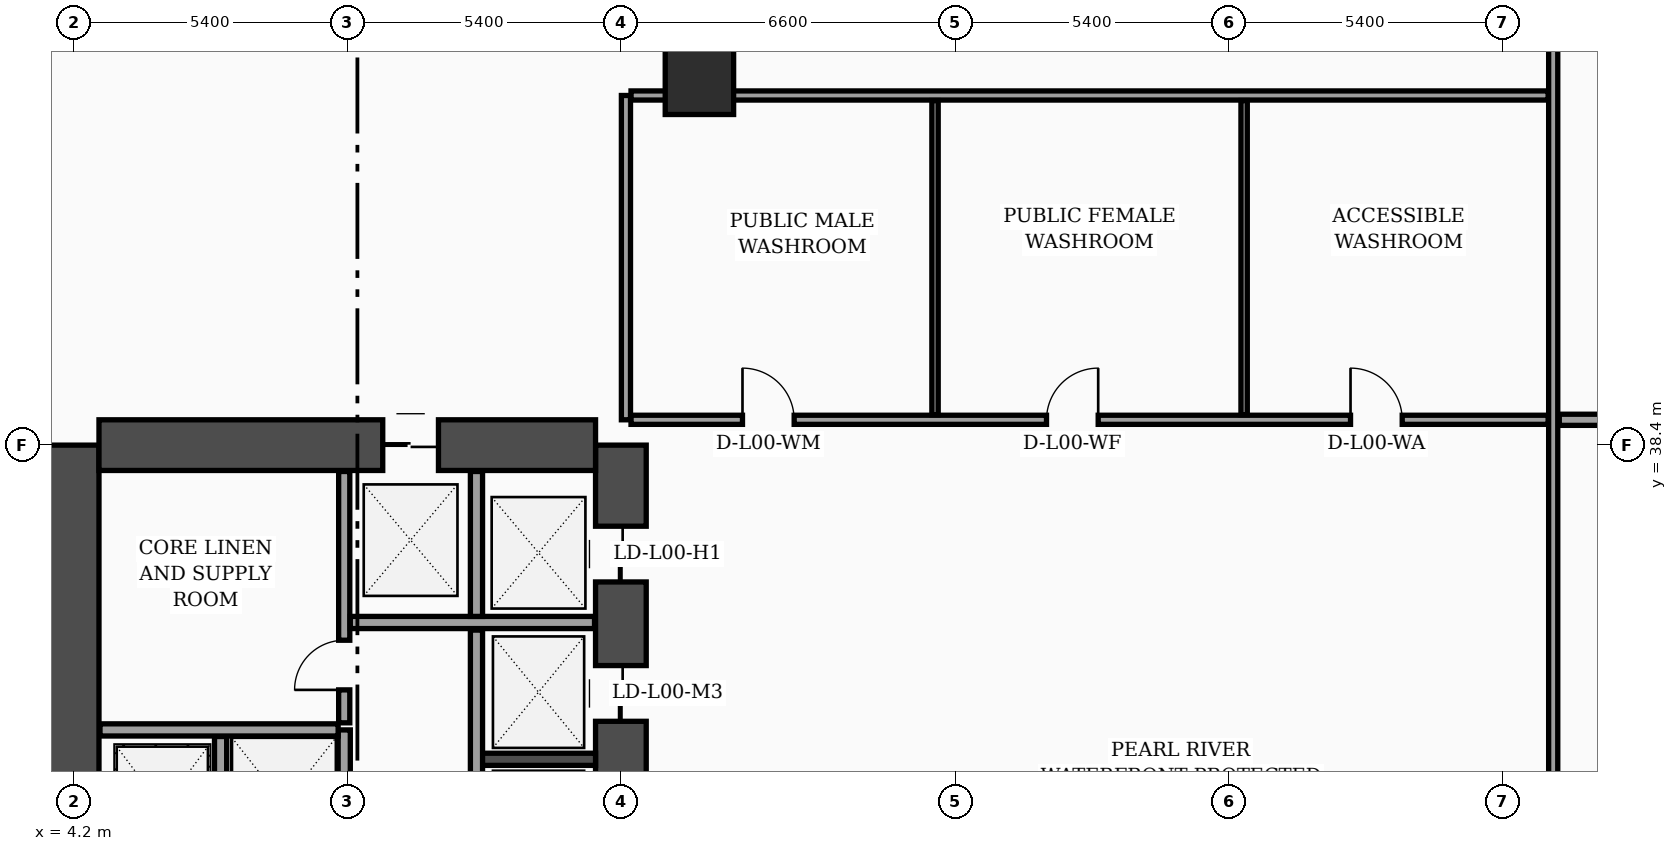
"""IFC4 building model, lengths in metres.
Left out: names, types, materials, properties, quantities, classifications, styles, units other than length and angle.
Written with IfcOpenShell. Run it as: python <this file> out.ifc"""

import sys

from ifc_helpers import new_model, si_unit, direction, frame, frame_2d, origin, origin_2d, place, context, subcontext, project, spatial, rectangle, extrude, element, fill, save


model = new_model("IFC4")
c1 = context("Model", 3, precision=1e-05, world=origin(), true_north=direction((0.0, 1.0)))
c2 = subcontext(c1, "Body", "Model", "MODEL_VIEW")
j1 = project(units=[si_unit("LENGTHUNIT", "METRE"), si_unit("PLANEANGLEUNIT", "RADIAN")], contexts=[c1])
p1 = place(None, origin())
s1 = spatial("IfcSite", under=j1, at=p1, CompositionType="ELEMENT")
p2 = place(p1, origin())
s2 = spatial("IfcBuilding", under=s1, at=p2, CompositionType="ELEMENT")
p3 = place(p2, origin())
s3 = spatial("IfcBuildingStorey", under=s2, at=p3, CompositionType="ELEMENT", Elevation=0.0)
p4 = place(p3, frame((4.2, 16.8, 0.0), z_axis=(0.0, 0.0, 1.0), x_axis=(0.0, 1.0, 0.0)))
e1 = element("IfcWall", 1, at=p4, inside=s3, PredefinedType="SHEAR", context=c2, shape_type="SweptSolid", body=[
    extrude(rectangle(XDim=21.6, YDim=1.0, at=frame_2d((10.8, 0.0))), origin(), (0.0, 0.0, 1.0), 5.68),
])
p5 = place(p3, frame((15.0, 16.8, 0.0), z_axis=(0.0, 0.0, 1.0), x_axis=(0.0, 1.0, 0.0)))
e2 = element("IfcWall", 2, at=p5, inside=s3, PredefinedType="SHEAR", context=c2, shape_type="SweptSolid", body=[
    extrude(rectangle(XDim=21.6, YDim=1.0, at=frame_2d((10.8, 0.0))), origin(), (0.0, 0.0, 1.0), 5.68),
])
p6 = place(p5, frame((8.65, 0.0, 0.0)))
e3 = element("IfcOpeningElement", 3, at=p6, cuts=e2, PredefinedType="OPENING", context=c2, shape_type="SweptSolid", body=[
    extrude(rectangle(XDim=1.1, YDim=2.2, at=frame_2d((0.55, 1.1))), frame((0.0, 0.51, 0.0), z_axis=(0.0, -1.0, 0.0), x_axis=(1.0, 0.0, 0.0)), (0.0, 0.0, 1.0), 1.02),
])
p7 = place(p5, frame((1.25, 0.0, 0.0)))
e4 = element("IfcOpeningElement", 4, at=p7, cuts=e2, PredefinedType="OPENING", context=c2, shape_type="SweptSolid", body=[
    extrude(rectangle(XDim=1.1, YDim=2.2, at=frame_2d((0.55, 1.1))), frame((0.0, 0.51, 0.0), z_axis=(0.0, -1.0, 0.0), x_axis=(1.0, 0.0, 0.0)), (0.0, 0.0, 1.0), 1.02),
])
p8 = place(p5, frame((3.8, 0.0, 0.0)))
e5 = element("IfcOpeningElement", 5, at=p8, cuts=e2, PredefinedType="OPENING", context=c2, shape_type="SweptSolid", body=[
    extrude(rectangle(XDim=1.1, YDim=2.2, at=frame_2d((0.55, 1.1))), frame((0.0, 0.51, 0.0), z_axis=(0.0, -1.0, 0.0), x_axis=(1.0, 0.0, 0.0)), (0.0, 0.0, 1.0), 1.02),
])
p9 = place(p5, frame((6.35, 0.0, 0.0)))
e6 = element("IfcOpeningElement", 6, at=p9, cuts=e2, PredefinedType="OPENING", context=c2, shape_type="SweptSolid", body=[
    extrude(rectangle(XDim=1.1, YDim=2.2, at=frame_2d((0.55, 1.1))), frame((0.0, 0.51, 0.0), z_axis=(0.0, -1.0, 0.0), x_axis=(1.0, 0.0, 0.0)), (0.0, 0.0, 1.0), 1.02),
])
p10 = place(p5, frame((10.85, 0.0, 0.0)))
e7 = element("IfcOpeningElement", 7, at=p10, cuts=e2, PredefinedType="OPENING", context=c2, shape_type="SweptSolid", body=[
    extrude(rectangle(XDim=1.1, YDim=2.2, at=frame_2d((0.55, 1.1))), frame((0.0, 0.51, 0.0), z_axis=(0.0, -1.0, 0.0), x_axis=(1.0, 0.0, 0.0)), (0.0, 0.0, 1.0), 1.02),
])
p11 = place(p5, frame((13.5, 0.0, 0.0)))
e8 = element("IfcOpeningElement", 8, at=p11, cuts=e2, PredefinedType="OPENING", context=c2, shape_type="SweptSolid", body=[
    extrude(rectangle(XDim=1.1, YDim=2.2, at=frame_2d((0.55, 1.1))), frame((0.0, 0.51, 0.0), z_axis=(0.0, -1.0, 0.0), x_axis=(1.0, 0.0, 0.0)), (0.0, 0.0, 1.0), 1.02),
])
p12 = place(p5, frame((16.15, 0.0, 0.0)))
e9 = element("IfcOpeningElement", 9, at=p12, cuts=e2, PredefinedType="OPENING", context=c2, shape_type="SweptSolid", body=[
    extrude(rectangle(XDim=1.1, YDim=2.2, at=frame_2d((0.55, 1.1))), frame((0.0, 0.51, 0.0), z_axis=(0.0, -1.0, 0.0), x_axis=(1.0, 0.0, 0.0)), (0.0, 0.0, 1.0), 1.02),
])
p13 = place(p5, frame((18.9, 0.0, 0.0)))
e10 = element("IfcOpeningElement", 10, at=p13, cuts=e2, PredefinedType="OPENING", context=c2, shape_type="SweptSolid", body=[
    extrude(rectangle(XDim=1.1, YDim=2.2, at=frame_2d((0.55, 1.1))), frame((0.0, 0.51, 0.0), z_axis=(0.0, -1.0, 0.0), x_axis=(1.0, 0.0, 0.0)), (0.0, 0.0, 1.0), 1.02),
])
p14 = place(p3, frame((4.7, 38.4, 0.0), z_axis=(0.0, 0.0, 1.0), x_axis=(1.0, 0.0, 0.0)))
e11 = element("IfcWall", 11, at=p14, inside=s3, PredefinedType="SHEAR", context=c2, shape_type="SweptSolid", body=[
    extrude(rectangle(XDim=9.8, YDim=1.0, at=frame_2d((4.9, 0.0))), origin(), (0.0, 0.0, 1.0), 5.68),
])
p15 = place(p14, frame((5.6, 0.0, 0.0)))
e12 = element("IfcOpeningElement", 12, at=p15, cuts=e11, PredefinedType="OPENING", context=c2, shape_type="SweptSolid", body=[
    extrude(rectangle(XDim=1.1, YDim=2.2, at=frame_2d((0.55, 1.1))), frame((0.0, 0.51, 0.0), z_axis=(0.0, -1.0, 0.0), x_axis=(1.0, 0.0, 0.0)), (0.0, 0.0, 1.0), 1.02),
])
p16 = place(p3, frame((12.18, 32.2, 0.0), z_axis=(0.0, 0.0, 1.0), x_axis=(1.0, 0.0, 0.0)))
e13 = element("IfcWall", 13, at=p16, inside=s3, PredefinedType="SOLIDWALL", context=c2, shape_type="SweptSolid", body=[
    extrude(rectangle(XDim=2.32, YDim=0.24, at=frame_2d((1.16, 0.0))), origin(), (0.0, 0.0, 1.0), 5.68),
])
p17 = place(p3, frame((16.55, 45.6, 0.0), z_axis=(0.0, 0.0, 1.0), x_axis=(1.0, 0.0, 0.0)))
e14 = element("IfcColumn", 14, at=p17, inside=s3, PredefinedType="COLUMN", context=c2, shape_type="SweptSolid", body=[
    extrude(rectangle(XDim=1.35, YDim=1.35, at=origin_2d()), origin(), (0.0, 0.0, 1.0), 5.68),
])
p18 = place(p3, frame((7.1, 30.02, 0.0), z_axis=(0.0, 0.0, 1.0), x_axis=(0.0, 1.0, 0.0)))
e15 = element("IfcWall", 15, at=p18, inside=s3, PredefinedType="SOLIDWALL", context=c2, shape_type="SweptSolid", body=[
    extrude(rectangle(XDim=2.63, YDim=0.24, at=frame_2d((1.315, 0.0))), origin(), (0.0, 0.0, 1.0), 5.68),
])
p19 = place(p3, frame((9.54, 29.88, 0.0), z_axis=(0.0, 0.0, 1.0), x_axis=(0.0, 1.0, 0.0)))
e16 = element("IfcWall", 16, at=p19, inside=s3, PredefinedType="SOLIDWALL", context=c2, shape_type="SweptSolid", body=[
    extrude(rectangle(XDim=2.9, YDim=0.24, at=frame_2d((1.45, 0.0))), origin(), (0.0, 0.0, 1.0), 5.68),
])
p20 = place(p19, frame((0.7, 0.0, 0.0)))
e17 = element("IfcOpeningElement", 17, at=p20, cuts=e16, PredefinedType="OPENING", context=c2, shape_type="SweptSolid", body=[
    extrude(rectangle(XDim=1.3, YDim=2.35, at=frame_2d((0.65, 1.175))), frame((0.0, 0.13, 0.0), z_axis=(0.0, -1.0, 0.0), x_axis=(1.0, 0.0, 0.0)), (0.0, 0.0, 1.0), 0.26),
])
p21 = place(p3, frame((4.72, 32.78, 0.0), z_axis=(0.0, 0.0, 1.0), x_axis=(1.0, 0.0, 0.0)))
e18 = element("IfcWall", 18, at=p21, inside=s3, PredefinedType="SOLIDWALL", context=c2, shape_type="SweptSolid", body=[
    extrude(rectangle(XDim=4.7, YDim=0.24, at=frame_2d((2.35, 0.0))), origin(), (0.0, 0.0, 1.0), 5.68),
])
p22 = place(p3, frame((9.54, 32.92, 0.0), z_axis=(0.0, 0.0, 1.0), x_axis=(0.0, 1.0, 0.0)))
e19 = element("IfcWall", 19, at=p22, inside=s3, PredefinedType="SOLIDWALL", context=c2, shape_type="SweptSolid", body=[
    extrude(rectangle(XDim=4.96, YDim=0.22, at=frame_2d((2.48, 0.0))), origin(), (0.0, 0.0, 1.0), 5.68),
])
p23 = place(p22, frame((0.65, 0.0, 0.0)))
e20 = element("IfcOpeningElement", 20, at=p23, cuts=e19, PredefinedType="OPENING", context=c2, shape_type="SweptSolid", body=[
    extrude(rectangle(XDim=0.98, YDim=2.15, at=frame_2d((0.49, 1.075))), frame((0.0, 0.12, 0.0), z_axis=(0.0, -1.0, 0.0), x_axis=(1.0, 0.0, 0.0)), (0.0, 0.0, 1.0), 0.24),
])
p24 = place(p3, frame((12.15, 27.0, 0.0), z_axis=(0.0, 0.0, 1.0), x_axis=(0.0, 1.0, 0.0)))
e21 = element("IfcWall", 21, at=p24, inside=s3, PredefinedType="SOLIDWALL", context=c2, shape_type="SweptSolid", body=[
    extrude(rectangle(XDim=7.75, YDim=0.24, at=frame_2d((3.875, 0.0))), origin(), (0.0, 0.0, 1.0), 5.68),
])
p25 = place(p3, frame((9.66, 34.9, 0.0), z_axis=(0.0, 0.0, 1.0), x_axis=(1.0, 0.0, 0.0)))
e22 = element("IfcWall", 22, at=p25, inside=s3, PredefinedType="SOLIDWALL", context=c2, shape_type="SweptSolid", body=[
    extrude(rectangle(XDim=4.82, YDim=0.24, at=frame_2d((2.41, 0.0))), origin(), (0.0, 0.0, 1.0), 5.68),
])
p26 = place(p3, frame((12.15, 35.02, 0.0), z_axis=(0.0, 0.0, 1.0), x_axis=(0.0, 1.0, 0.0)))
e23 = element("IfcWall", 23, at=p26, inside=s3, PredefinedType="SOLIDWALL", context=c2, shape_type="SweptSolid", body=[
    extrude(rectangle(XDim=2.86, YDim=0.24, at=frame_2d((1.43, 0.0))), origin(), (0.0, 0.0, 1.0), 5.68),
])
p27 = place(p3, frame((15.2, 38.9, 0.0), z_axis=(0.0, 0.0, 1.0), x_axis=(1.0, 0.0, 0.0)))
e24 = element("IfcWall", 24, at=p27, inside=s3, PredefinedType="PARTITIONING", context=c2, shape_type="SweptSolid", body=[
    extrude(rectangle(XDim=18.1, YDim=0.18, at=frame_2d((9.05, 0.0))), origin(), (0.0, 0.0, 1.0), 4.88),
])
p28 = place(p27, frame((2.2, 0.0, 0.0)))
e25 = element("IfcOpeningElement", 25, at=p28, cuts=e24, PredefinedType="OPENING", context=c2, shape_type="SweptSolid", body=[
    extrude(rectangle(XDim=1.02, YDim=2.2, at=frame_2d((0.51, 1.1))), frame((0.0, 0.1, 0.0), z_axis=(0.0, -1.0, 0.0), x_axis=(1.0, 0.0, 0.0)), (0.0, 0.0, 1.0), 0.2),
])
p29 = place(p27, frame((8.2, 0.0, 0.0)))
e26 = element("IfcOpeningElement", 26, at=p29, cuts=e24, PredefinedType="OPENING", context=c2, shape_type="SweptSolid", body=[
    extrude(rectangle(XDim=1.02, YDim=2.2, at=frame_2d((0.51, 1.1))), frame((0.0, 0.1, 0.0), z_axis=(0.0, -1.0, 0.0), x_axis=(1.0, 0.0, 0.0)), (0.0, 0.0, 1.0), 0.2),
])
p30 = place(p27, frame((14.2, 0.0, 0.0)))
e27 = element("IfcOpeningElement", 27, at=p30, cuts=e24, PredefinedType="OPENING", context=c2, shape_type="SweptSolid", body=[
    extrude(rectangle(XDim=1.02, YDim=2.2, at=frame_2d((0.51, 1.1))), frame((0.0, 0.1, 0.0), z_axis=(0.0, -1.0, 0.0), x_axis=(1.0, 0.0, 0.0)), (0.0, 0.0, 1.0), 0.2),
])
p31 = place(p3, frame((15.2, 45.3, 0.0), z_axis=(0.0, 0.0, 1.0), x_axis=(1.0, 0.0, 0.0)))
e28 = element("IfcWall", 28, at=p31, inside=s3, PredefinedType="PARTITIONING", context=c2, shape_type="SweptSolid", body=[
    extrude(rectangle(XDim=18.1, YDim=0.18, at=frame_2d((9.05, 0.0))), origin(), (0.0, 0.0, 1.0), 4.88),
])
p32 = place(p3, frame((15.1, 38.9, 0.0), z_axis=(0.0, 0.0, 1.0), x_axis=(0.0, 1.0, 0.0)))
e29 = element("IfcWall", 29, at=p32, inside=s3, PredefinedType="PARTITIONING", context=c2, shape_type="SweptSolid", body=[
    extrude(rectangle(XDim=6.4, YDim=0.18, at=frame_2d((3.2, 0.0))), origin(), (0.0, 0.0, 1.0), 4.88),
])
p33 = place(p3, frame((21.2, 39.0, 0.0), z_axis=(0.0, 0.0, 1.0), x_axis=(0.0, 1.0, 0.0)))
e30 = element("IfcWall", 30, at=p33, inside=s3, PredefinedType="PARTITIONING", context=c2, shape_type="SweptSolid", body=[
    extrude(rectangle(XDim=6.2, YDim=0.125, at=frame_2d((3.1, 0.0))), origin(), (0.0, 0.0, 1.0), 4.88),
])
p34 = place(p3, frame((27.3, 39.0, 0.0), z_axis=(0.0, 0.0, 1.0), x_axis=(0.0, 1.0, 0.0)))
e31 = element("IfcWall", 31, at=p34, inside=s3, PredefinedType="PARTITIONING", context=c2, shape_type="SweptSolid", body=[
    extrude(rectangle(XDim=6.2, YDim=0.125, at=frame_2d((3.1, 0.0))), origin(), (0.0, 0.0, 1.0), 5.68),
])
p35 = place(p3, frame((33.4, 0.3, 0.0), z_axis=(0.0, 0.0, 1.0), x_axis=(0.0, 1.0, 0.0)))
e32 = element("IfcWall", 32, at=p35, inside=s3, PredefinedType="PARTITIONING", context=c2, shape_type="SweptSolid", body=[
    extrude(rectangle(XDim=57.64, YDim=0.18, at=frame_2d((28.82, 0.0))), origin(), (0.0, 0.0, 1.0), 4.88),
])
p36 = place(p35, frame((6.0, 0.0, 0.0)))
e33 = element("IfcOpeningElement", 33, at=p36, cuts=e32, PredefinedType="OPENING", context=c2, shape_type="SweptSolid", body=[
    extrude(rectangle(XDim=1.5, YDim=2.22, at=frame_2d((0.75, 1.11))), frame((0.0, 0.1, 0.0), z_axis=(0.0, -1.0, 0.0), x_axis=(1.0, 0.0, 0.0)), (0.0, 0.0, 1.0), 0.2),
])
p37 = place(p35, frame((20.0, 0.0, 0.0)))
e34 = element("IfcOpeningElement", 34, at=p37, cuts=e32, PredefinedType="OPENING", context=c2, shape_type="SweptSolid", body=[
    extrude(rectangle(XDim=1.8, YDim=2.4, at=frame_2d((0.9, 1.2))), frame((0.0, 0.1, 0.0), z_axis=(0.0, -1.0, 0.0), x_axis=(1.0, 0.0, 0.0)), (0.0, 0.0, 1.0), 0.2),
])
p38 = place(p35, frame((49.0, 0.0, 0.0)))
e35 = element("IfcOpeningElement", 35, at=p38, cuts=e32, PredefinedType="OPENING", context=c2, shape_type="SweptSolid", body=[
    extrude(rectangle(XDim=1.6, YDim=2.35, at=frame_2d((0.8, 1.175))), frame((0.0, 0.1, 0.0), z_axis=(0.0, -1.0, 0.0), x_axis=(1.0, 0.0, 0.0)), (0.0, 0.0, 1.0), 0.2),
])
p39 = place(p3, frame((33.52, 38.9, 0.0), z_axis=(0.0, 0.0, 1.0), x_axis=(1.0, 0.0, 0.0)))
e36 = element("IfcWall", 36, at=p39, inside=s3, PredefinedType="SOLIDWALL", context=c2, shape_type="SweptSolid", body=[
    extrude(rectangle(XDim=24.18, YDim=0.22, at=frame_2d((12.09, 0.0))), origin(), (0.0, 0.0, 1.0), 4.88),
])
p40 = place(p23, origin())
e37 = element("IfcDoor", 37, at=p40, inside=s3, OperationType="SINGLE_SWING_LEFT", PredefinedType="DOOR", context=c2, shape_type="SweptSolid", body=[
    extrude(rectangle(XDim=0.98, YDim=2.15, at=frame_2d((0.49, 1.075))), frame((0.0, 0.025, 0.0), z_axis=(0.0, -1.0, 0.0), x_axis=(1.0, 0.0, 0.0)), (0.0, 0.0, 1.0), 0.05),
])
fill(e20, e37)
p41 = place(p28, origin())
e38 = element("IfcDoor", 38, at=p41, inside=s3, OperationType="SINGLE_SWING_LEFT", PredefinedType="DOOR", context=c2, shape_type="SweptSolid", body=[
    extrude(rectangle(XDim=1.02, YDim=2.2, at=frame_2d((0.51, 1.1))), frame((0.0, 0.025, 0.0), z_axis=(0.0, -1.0, 0.0), x_axis=(1.0, 0.0, 0.0)), (0.0, 0.0, 1.0), 0.05),
])
fill(e25, e38)
p42 = place(p29, origin())
e39 = element("IfcDoor", 39, at=p42, inside=s3, OperationType="SINGLE_SWING_RIGHT", PredefinedType="DOOR", context=c2, shape_type="SweptSolid", body=[
    extrude(rectangle(XDim=1.02, YDim=2.2, at=frame_2d((0.51, 1.1))), frame((0.0, 0.025, 0.0), z_axis=(0.0, -1.0, 0.0), x_axis=(1.0, 0.0, 0.0)), (0.0, 0.0, 1.0), 0.05),
])
fill(e26, e39)
p43 = place(p30, origin())
e40 = element("IfcDoor", 40, at=p43, inside=s3, OperationType="SINGLE_SWING_LEFT", PredefinedType="DOOR", context=c2, shape_type="SweptSolid", body=[
    extrude(rectangle(XDim=1.02, YDim=2.2, at=frame_2d((0.51, 1.1))), frame((0.0, 0.025, 0.0), z_axis=(0.0, -1.0, 0.0), x_axis=(1.0, 0.0, 0.0)), (0.0, 0.0, 1.0), 0.05),
])
fill(e27, e40)
p44 = place(p12, origin())
e41 = element("IfcDoor", 41, at=p44, inside=s3, OperationType="DOUBLE_DOOR_SLIDING", PredefinedType="DOOR", context=c2, shape_type="SweptSolid", body=[
    extrude(rectangle(XDim=1.1, YDim=2.2, at=frame_2d((0.55, 1.1))), frame((0.0, 0.025, 0.0), z_axis=(0.0, -1.0, 0.0), x_axis=(1.0, 0.0, 0.0)), (0.0, 0.0, 1.0), 0.05),
])
fill(e9, e41)
p45 = place(p13, origin())
e42 = element("IfcDoor", 42, at=p45, inside=s3, OperationType="DOUBLE_DOOR_SLIDING", PredefinedType="DOOR", context=c2, shape_type="SweptSolid", body=[
    extrude(rectangle(XDim=1.1, YDim=2.2, at=frame_2d((0.55, 1.1))), frame((0.0, 0.025, 0.0), z_axis=(0.0, -1.0, 0.0), x_axis=(1.0, 0.0, 0.0)), (0.0, 0.0, 1.0), 0.05),
])
fill(e10, e42)
p46 = place(p15, origin())
e43 = element("IfcDoor", 43, at=p46, inside=s3, OperationType="DOUBLE_DOOR_SLIDING", PredefinedType="DOOR", context=c2, shape_type="SweptSolid", body=[
    extrude(rectangle(XDim=1.1, YDim=2.2, at=frame_2d((0.55, 1.1))), frame((0.0, 0.025, 0.0), z_axis=(0.0, -1.0, 0.0), x_axis=(1.0, 0.0, 0.0)), (0.0, 0.0, 1.0), 0.05),
])
fill(e12, e43)
save(model, sys.argv[1])
